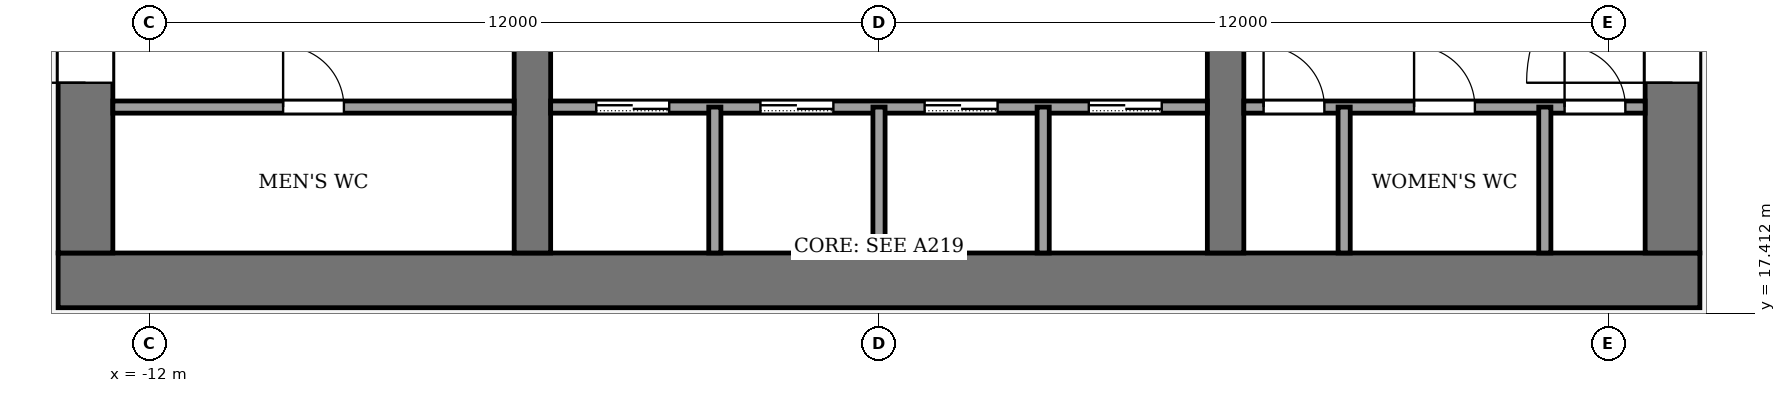
"""IFC4 building model, lengths in metres.
Left out: names, types, materials, properties, quantities, classifications, styles, units other than length and angle.
Written with IfcOpenShell. Run it as: python <this file> out.ifc"""

import sys

from ifc_helpers import new_model, si_unit, direction, frame, frame_2d, origin, place, context, subcontext, project, spatial, rectangle, extrude, element, fill, save


model = new_model("IFC4")
c1 = context("Model", 3, precision=1e-05, world=origin(), true_north=direction((0.0, 1.0)))
c2 = subcontext(c1, "Body", "Model", "MODEL_VIEW")
j1 = project(units=[si_unit("LENGTHUNIT", "METRE"), si_unit("PLANEANGLEUNIT", "RADIAN")], contexts=[c1])
p1 = place(None, origin())
s1 = spatial("IfcSite", under=j1, at=p1, CompositionType="ELEMENT")
p2 = place(p1, origin())
s2 = spatial("IfcBuilding", under=s1, at=p2, CompositionType="ELEMENT")
p3 = place(p2, frame((0.0, 0.0, 182.0)))
s3 = spatial("IfcBuildingStorey", under=s2, at=p3, CompositionType="ELEMENT", Elevation=182.0)
p4 = place(p3, frame((-13.5, 17.95, -0.13), z_axis=(0.0, 0.0, 1.0), x_axis=(1.0, 0.0, 0.0)))
e1 = element("IfcWall", 1, at=p4, inside=s3, PredefinedType="SHEAR", context=c2, shape_type="SweptSolid", body=[
    extrude(rectangle(XDim=27.0, YDim=0.9, at=frame_2d((13.5, 0.0))), origin(), (0.0, 0.0, 1.0), 4.0),
])
p5 = place(p3, frame((-13.05, 18.4, -0.13), z_axis=(0.0, 0.0, 1.0), x_axis=(0.0, 1.0, 0.0)))
e2 = element("IfcWall", 2, at=p5, inside=s3, PredefinedType="SHEAR", context=c2, shape_type="SweptSolid", body=[
    extrude(rectangle(XDim=19.2, YDim=0.9, at=frame_2d((9.6, 0.0))), origin(), (0.0, 0.0, 1.0), 4.0),
])
p6 = place(p5, frame((2.8, 0.0, 0.13)))
e3 = element("IfcOpeningElement", 3, at=p6, cuts=e2, PredefinedType="OPENING", context=c2, shape_type="SweptSolid", body=[
    extrude(rectangle(XDim=2.4, YDim=2.4, at=frame_2d((1.2, 1.2))), frame((0.0, 0.46, 0.0), z_axis=(0.0, -1.0, 0.0), x_axis=(1.0, 0.0, 0.0)), (0.0, 0.0, 1.0), 0.92),
])
p7 = place(p5, frame((13.4, 0.0, 0.13)))
e4 = element("IfcOpeningElement", 4, at=p7, cuts=e2, PredefinedType="OPENING", context=c2, shape_type="SweptSolid", body=[
    extrude(rectangle(XDim=1.4, YDim=2.2, at=frame_2d((0.7, 1.1))), frame((0.0, 0.46, 0.0), z_axis=(0.0, -1.0, 0.0), x_axis=(1.0, 0.0, 0.0)), (0.0, 0.0, 1.0), 0.92),
])
p8 = place(p3, frame((13.05, 18.4, -0.13), z_axis=(0.0, 0.0, 1.0), x_axis=(0.0, 1.0, 0.0)))
e5 = element("IfcWall", 5, at=p8, inside=s3, PredefinedType="SHEAR", context=c2, shape_type="SweptSolid", body=[
    extrude(rectangle(XDim=19.2, YDim=0.9, at=frame_2d((9.6, 0.0))), origin(), (0.0, 0.0, 1.0), 4.0),
])
p9 = place(p8, frame((2.8, 0.0, 0.13)))
e6 = element("IfcOpeningElement", 6, at=p9, cuts=e5, PredefinedType="OPENING", context=c2, shape_type="SweptSolid", body=[
    extrude(rectangle(XDim=2.4, YDim=2.4, at=frame_2d((1.2, 1.2))), frame((0.0, 0.46, 0.0), z_axis=(0.0, -1.0, 0.0), x_axis=(1.0, 0.0, 0.0)), (0.0, 0.0, 1.0), 0.92),
])
p10 = place(p8, frame((13.3, 0.0, 0.13)))
e7 = element("IfcOpeningElement", 7, at=p10, cuts=e5, PredefinedType="OPENING", context=c2, shape_type="SweptSolid", body=[
    extrude(rectangle(XDim=2.4, YDim=2.4, at=frame_2d((1.2, 1.2))), frame((0.0, 0.46, 0.0), z_axis=(0.0, -1.0, 0.0), x_axis=(1.0, 0.0, 0.0)), (0.0, 0.0, 1.0), 0.92),
])
p11 = place(p3, frame((-5.7, 18.4, -0.13), z_axis=(0.0, 0.0, 1.0), x_axis=(0.0, 1.0, 0.0)))
e8 = element("IfcWall", 8, at=p11, inside=s3, PredefinedType="SHEAR", context=c2, shape_type="SweptSolid", body=[
    extrude(rectangle(XDim=19.2, YDim=0.6, at=frame_2d((9.6, 0.0))), origin(), (0.0, 0.0, 1.0), 4.0),
])
p12 = place(p11, frame((8.35, 0.0, 0.13)))
e9 = element("IfcOpeningElement", 9, at=p12, cuts=e8, PredefinedType="OPENING", context=c2, shape_type="SweptSolid", body=[
    extrude(rectangle(XDim=0.9, YDim=2.1, at=frame_2d((0.45, 1.05))), frame((0.0, 0.31, 0.0), z_axis=(0.0, -1.0, 0.0), x_axis=(1.0, 0.0, 0.0)), (0.0, 0.0, 1.0), 0.62),
])
p13 = place(p3, frame((5.7, 18.4, -0.13), z_axis=(0.0, 0.0, 1.0), x_axis=(0.0, 1.0, 0.0)))
e10 = element("IfcWall", 10, at=p13, inside=s3, PredefinedType="SHEAR", context=c2, shape_type="SweptSolid", body=[
    extrude(rectangle(XDim=19.2, YDim=0.6, at=frame_2d((9.6, 0.0))), origin(), (0.0, 0.0, 1.0), 4.0),
])
p14 = place(p13, frame((13.3, 0.0, 0.13)))
e11 = element("IfcOpeningElement", 11, at=p14, cuts=e10, PredefinedType="OPENING", context=c2, shape_type="SweptSolid", body=[
    extrude(rectangle(XDim=2.4, YDim=2.4, at=frame_2d((1.2, 1.2))), frame((0.0, 0.31, 0.0), z_axis=(0.0, -1.0, 0.0), x_axis=(1.0, 0.0, 0.0)), (0.0, 0.0, 1.0), 0.62),
])
p15 = place(p3, frame((-12.6, 20.8, 0.0), z_axis=(0.0, 0.0, 1.0), x_axis=(1.0, 0.0, 0.0)))
e12 = element("IfcWall", 12, at=p15, inside=s3, PredefinedType="PARTITIONING", context=c2, shape_type="SweptSolid", body=[
    extrude(rectangle(XDim=6.6, YDim=0.2, at=frame_2d((3.3, 0.0))), origin(), (0.0, 0.0, 1.0), 3.87),
])
p16 = place(p15, frame((2.8, 0.0, 0.0)))
e13 = element("IfcOpeningElement", 13, at=p16, cuts=e12, PredefinedType="OPENING", context=c2, shape_type="SweptSolid", body=[
    extrude(rectangle(XDim=1.0, YDim=2.1, at=frame_2d((0.5, 1.05))), frame((0.0, 0.11, 0.0), z_axis=(0.0, -1.0, 0.0), x_axis=(1.0, 0.0, 0.0)), (0.0, 0.0, 1.0), 0.22),
])
p17 = place(p3, frame((-5.4, 20.8, 0.0), z_axis=(0.0, 0.0, 1.0), x_axis=(1.0, 0.0, 0.0)))
e14 = element("IfcWall", 14, at=p17, inside=s3, PredefinedType="PARTITIONING", context=c2, shape_type="SweptSolid", body=[
    extrude(rectangle(XDim=10.8, YDim=0.2, at=frame_2d((5.4, 0.0))), origin(), (0.0, 0.0, 1.0), 3.87),
])
p18 = place(p17, frame((0.75, 0.0, 0.0)))
e15 = element("IfcOpeningElement", 15, at=p18, cuts=e14, PredefinedType="OPENING", context=c2, shape_type="SweptSolid", body=[
    extrude(rectangle(XDim=1.2, YDim=2.2, at=frame_2d((0.6, 1.1))), frame((0.0, 0.11, 0.0), z_axis=(0.0, -1.0, 0.0), x_axis=(1.0, 0.0, 0.0)), (0.0, 0.0, 1.0), 0.22),
])
p19 = place(p17, frame((3.45, 0.0, 0.0)))
e16 = element("IfcOpeningElement", 16, at=p19, cuts=e14, PredefinedType="OPENING", context=c2, shape_type="SweptSolid", body=[
    extrude(rectangle(XDim=1.2, YDim=2.2, at=frame_2d((0.6, 1.1))), frame((0.0, 0.11, 0.0), z_axis=(0.0, -1.0, 0.0), x_axis=(1.0, 0.0, 0.0)), (0.0, 0.0, 1.0), 0.22),
])
p20 = place(p17, frame((6.15, 0.0, 0.0)))
e17 = element("IfcOpeningElement", 17, at=p20, cuts=e14, PredefinedType="OPENING", context=c2, shape_type="SweptSolid", body=[
    extrude(rectangle(XDim=1.2, YDim=2.2, at=frame_2d((0.6, 1.1))), frame((0.0, 0.11, 0.0), z_axis=(0.0, -1.0, 0.0), x_axis=(1.0, 0.0, 0.0)), (0.0, 0.0, 1.0), 0.22),
])
p21 = place(p17, frame((8.85, 0.0, 0.0)))
e18 = element("IfcOpeningElement", 18, at=p21, cuts=e14, PredefinedType="OPENING", context=c2, shape_type="SweptSolid", body=[
    extrude(rectangle(XDim=1.2, YDim=2.2, at=frame_2d((0.6, 1.1))), frame((0.0, 0.11, 0.0), z_axis=(0.0, -1.0, 0.0), x_axis=(1.0, 0.0, 0.0)), (0.0, 0.0, 1.0), 0.22),
])
p22 = place(p3, frame((6.0, 20.8, 0.0), z_axis=(0.0, 0.0, 1.0), x_axis=(1.0, 0.0, 0.0)))
e19 = element("IfcWall", 19, at=p22, inside=s3, PredefinedType="PARTITIONING", context=c2, shape_type="SweptSolid", body=[
    extrude(rectangle(XDim=6.6, YDim=0.2, at=frame_2d((3.3, 0.0))), origin(), (0.0, 0.0, 1.0), 3.87),
])
p23 = place(p22, frame((0.325, 0.0, 0.0)))
e20 = element("IfcOpeningElement", 20, at=p23, cuts=e19, PredefinedType="OPENING", context=c2, shape_type="SweptSolid", body=[
    extrude(rectangle(XDim=1.0, YDim=2.1, at=frame_2d((0.5, 1.05))), frame((0.0, 0.11, 0.0), z_axis=(0.0, -1.0, 0.0), x_axis=(1.0, 0.0, 0.0)), (0.0, 0.0, 1.0), 0.22),
])
p24 = place(p22, frame((2.8, 0.0, 0.0)))
e21 = element("IfcOpeningElement", 21, at=p24, cuts=e19, PredefinedType="OPENING", context=c2, shape_type="SweptSolid", body=[
    extrude(rectangle(XDim=1.0, YDim=2.1, at=frame_2d((0.5, 1.05))), frame((0.0, 0.11, 0.0), z_axis=(0.0, -1.0, 0.0), x_axis=(1.0, 0.0, 0.0)), (0.0, 0.0, 1.0), 0.22),
])
p25 = place(p22, frame((5.275, 0.0, 0.0)))
e22 = element("IfcOpeningElement", 22, at=p25, cuts=e19, PredefinedType="OPENING", context=c2, shape_type="SweptSolid", body=[
    extrude(rectangle(XDim=1.0, YDim=2.1, at=frame_2d((0.5, 1.05))), frame((0.0, 0.11, 0.0), z_axis=(0.0, -1.0, 0.0), x_axis=(1.0, 0.0, 0.0)), (0.0, 0.0, 1.0), 0.22),
])
for number, where, z_axis, x_axis in (
    (23, (-2.7, 18.4, 0.0), (0.0, 0.0, 1.0), (0.0, 1.0, 0.0)),
    (24, (0.0, 18.4, 0.0), (0.0, 0.0, 1.0), (0.0, 1.0, 0.0)),
    (25, (2.7, 18.4, 0.0), (0.0, 0.0, 1.0), (0.0, 1.0, 0.0)),
    (26, (7.65, 18.4, 0.0), (0.0, 0.0, 1.0), (0.0, 1.0, 0.0)),
    (27, (10.95, 18.4, 0.0), (0.0, 0.0, 1.0), (0.0, 1.0, 0.0)),
):
    element("IfcWall", number, at=place(p3, frame(where, z_axis=z_axis, x_axis=x_axis)), inside=s3, PredefinedType="PARTITIONING", context=c2, shape_type="SweptSolid", body=[
        extrude(rectangle(XDim=2.4, YDim=0.2, at=frame_2d((1.2, 0.0))), origin(), (0.0, 0.0, 1.0), 3.87),
    ])
p26 = place(p18, origin())
e28 = element("IfcDoor", 28, at=p26, inside=s3, OperationType="SLIDING_TO_LEFT", PredefinedType="DOOR", context=c2, shape_type="SweptSolid", body=[
    extrude(rectangle(XDim=1.2, YDim=2.2, at=frame_2d((0.6, 1.1))), frame((0.0, 0.025, 0.0), z_axis=(0.0, -1.0, 0.0), x_axis=(1.0, 0.0, 0.0)), (0.0, 0.0, 1.0), 0.05),
])
fill(e15, e28)
p27 = place(p19, origin())
e29 = element("IfcDoor", 29, at=p27, inside=s3, OperationType="SLIDING_TO_LEFT", PredefinedType="DOOR", context=c2, shape_type="SweptSolid", body=[
    extrude(rectangle(XDim=1.2, YDim=2.2, at=frame_2d((0.6, 1.1))), frame((0.0, 0.025, 0.0), z_axis=(0.0, -1.0, 0.0), x_axis=(1.0, 0.0, 0.0)), (0.0, 0.0, 1.0), 0.05),
])
fill(e16, e29)
p28 = place(p20, origin())
e30 = element("IfcDoor", 30, at=p28, inside=s3, OperationType="SLIDING_TO_LEFT", PredefinedType="DOOR", context=c2, shape_type="SweptSolid", body=[
    extrude(rectangle(XDim=1.2, YDim=2.2, at=frame_2d((0.6, 1.1))), frame((0.0, 0.025, 0.0), z_axis=(0.0, -1.0, 0.0), x_axis=(1.0, 0.0, 0.0)), (0.0, 0.0, 1.0), 0.05),
])
fill(e17, e30)
p29 = place(p21, origin())
e31 = element("IfcDoor", 31, at=p29, inside=s3, OperationType="SLIDING_TO_LEFT", PredefinedType="DOOR", context=c2, shape_type="SweptSolid", body=[
    extrude(rectangle(XDim=1.2, YDim=2.2, at=frame_2d((0.6, 1.1))), frame((0.0, 0.025, 0.0), z_axis=(0.0, -1.0, 0.0), x_axis=(1.0, 0.0, 0.0)), (0.0, 0.0, 1.0), 0.05),
])
fill(e18, e31)
p30 = place(p16, origin())
e32 = element("IfcDoor", 32, at=p30, inside=s3, OperationType="SINGLE_SWING_LEFT", PredefinedType="DOOR", context=c2, shape_type="SweptSolid", body=[
    extrude(rectangle(XDim=1.0, YDim=2.1, at=frame_2d((0.5, 1.05))), frame((0.0, 0.025, 0.0), z_axis=(0.0, -1.0, 0.0), x_axis=(1.0, 0.0, 0.0)), (0.0, 0.0, 1.0), 0.05),
])
fill(e13, e32)
p31 = place(p23, origin())
e33 = element("IfcDoor", 33, at=p31, inside=s3, OperationType="SINGLE_SWING_LEFT", PredefinedType="DOOR", context=c2, shape_type="SweptSolid", body=[
    extrude(rectangle(XDim=1.0, YDim=2.1, at=frame_2d((0.5, 1.05))), frame((0.0, 0.025, 0.0), z_axis=(0.0, -1.0, 0.0), x_axis=(1.0, 0.0, 0.0)), (0.0, 0.0, 1.0), 0.05),
])
fill(e20, e33)
p32 = place(p24, origin())
e34 = element("IfcDoor", 34, at=p32, inside=s3, OperationType="SINGLE_SWING_LEFT", PredefinedType="DOOR", context=c2, shape_type="SweptSolid", body=[
    extrude(rectangle(XDim=1.0, YDim=2.1, at=frame_2d((0.5, 1.05))), frame((0.0, 0.025, 0.0), z_axis=(0.0, -1.0, 0.0), x_axis=(1.0, 0.0, 0.0)), (0.0, 0.0, 1.0), 0.05),
])
fill(e21, e34)
p33 = place(p25, origin())
e35 = element("IfcDoor", 35, at=p33, inside=s3, OperationType="SINGLE_SWING_LEFT", PredefinedType="DOOR", context=c2, shape_type="SweptSolid", body=[
    extrude(rectangle(XDim=1.0, YDim=2.1, at=frame_2d((0.5, 1.05))), frame((0.0, 0.025, 0.0), z_axis=(0.0, -1.0, 0.0), x_axis=(1.0, 0.0, 0.0)), (0.0, 0.0, 1.0), 0.05),
])
fill(e22, e35)
p34 = place(p6, origin())
e36 = element("IfcDoor", 36, at=p34, inside=s3, OperationType="DOUBLE_DOOR_SINGLE_SWING", PredefinedType="DOOR", context=c2, shape_type="SweptSolid", body=[
    extrude(rectangle(XDim=2.4, YDim=2.4, at=frame_2d((1.2, 1.2))), frame((0.0, 0.025, 0.0), z_axis=(0.0, -1.0, 0.0), x_axis=(1.0, 0.0, 0.0)), (0.0, 0.0, 1.0), 0.05),
])
fill(e3, e36)
p35 = place(p9, origin())
e37 = element("IfcDoor", 37, at=p35, inside=s3, OperationType="DOUBLE_DOOR_SINGLE_SWING", PredefinedType="DOOR", context=c2, shape_type="SweptSolid", body=[
    extrude(rectangle(XDim=2.4, YDim=2.4, at=frame_2d((1.2, 1.2))), frame((0.0, 0.025, 0.0), z_axis=(0.0, -1.0, 0.0), x_axis=(1.0, 0.0, 0.0)), (0.0, 0.0, 1.0), 0.05),
])
fill(e6, e37)
save(model, sys.argv[1])
